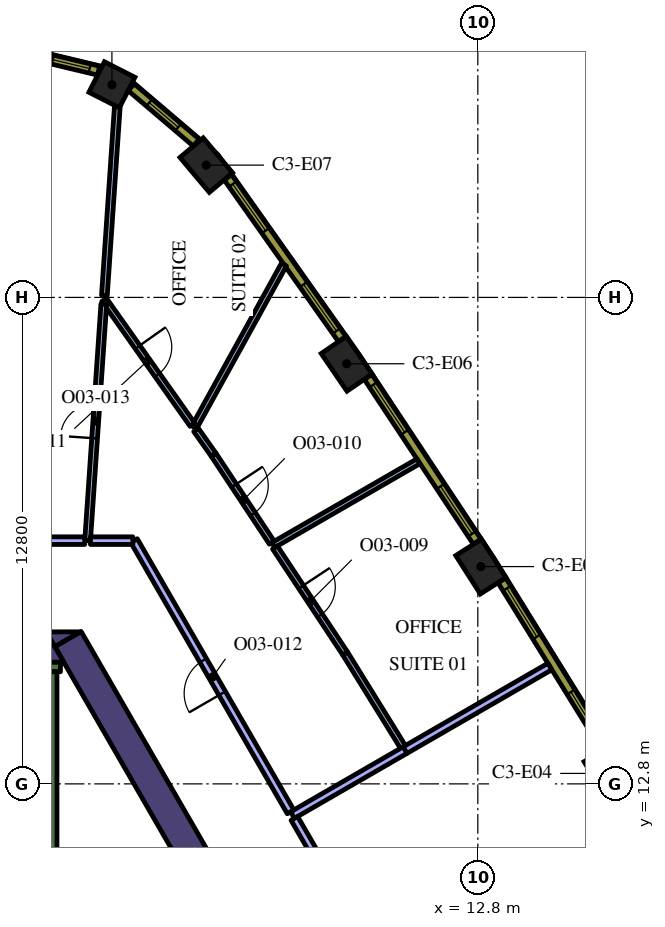
"""IFC4 building model, lengths in metres.
Left out: names, types, materials, properties, quantities, classifications, styles, units other than length and angle.
Written with IfcOpenShell. Run it as: python <this file> out.ifc"""

import sys

from ifc_helpers import new_model, si_unit, direction, frame, frame_2d, origin, origin_2d, place, context, subcontext, project, spatial, polyline, rectangle, outline, extrude, element, fill, save


model = new_model("IFC4")
c1 = context("Model", 3, precision=1e-05, world=origin(), true_north=direction((0.0, 1.0)))
c2 = subcontext(c1, "Body", "Model", "MODEL_VIEW")
j1 = project(units=[si_unit("LENGTHUNIT", "METRE"), si_unit("PLANEANGLEUNIT", "RADIAN")], contexts=[c1])
p1 = place(None, origin())
s1 = spatial("IfcSite", under=j1, at=p1, CompositionType="ELEMENT")
p2 = place(p1, origin())
s2 = spatial("IfcBuilding", under=s1, at=p2, CompositionType="ELEMENT")
p3 = place(p2, frame((0.0, 0.0, 166.8)))
s3 = spatial("IfcBuildingStorey", under=s2, at=p3, CompositionType="ELEMENT", Elevation=166.8)
for number, where, z_axis, x_axis in (
    (1, (16.247, 13.075, 0.0), (0.0, 0.0, 1.0), (-0.513, 0.858, 0.0)),
    (2, (12.88, 18.517, 0.0), (0.0, 0.0, 1.0), (-0.539, 0.842, 0.0)),
    (3, (9.348, 23.854, 0.0), (0.0, 0.0, 1.0), (-0.565, 0.825, 0.0)),
    (4, (5.654, 29.081, 0.0), (0.0, 0.0, 1.0), (-0.644, 0.765, 0.0)),
):
    element("IfcColumn", number, at=place(p3, frame(where, z_axis=z_axis, x_axis=x_axis)), inside=s3, PredefinedType="COLUMN", context=c2, shape_type="SweptSolid", body=[
        extrude(rectangle(XDim=1.2, YDim=0.8, at=origin_2d()), origin(), (0.0, 0.0, 1.0), 4.2),
    ])
p4 = place(p3, frame((3.171, 31.195, 0.0), z_axis=(0.0, 0.0, 1.0), x_axis=(-0.891486197647, 0.453047855535, 0.0)))
e5 = element("IfcColumn", 5, at=p4, inside=s3, PredefinedType="COLUMN", context=c2, shape_type="SweptSolid", body=[
    extrude(rectangle(XDim=0.9, YDim=0.9, at=origin_2d()), origin(), (0.0, 0.0, 1.0), 4.2),
])
p5 = place(p3, frame((8.279, 5.761, 0.0), z_axis=(0.0, 0.0, 1.0), x_axis=(-0.500010359015, 0.866019422922, 0.0)))
e6 = element("IfcWall", 6, at=p5, inside=s3, PredefinedType="SOLIDWALL", context=c2, shape_type="SweptSolid", body=[
    extrude(rectangle(XDim=12.528, YDim=0.8, at=frame_2d((6.264, 0.0))), origin(), (0.0, 0.0, 1.0), 4.2),
])
p6 = place(p3, origin())
e7 = element("IfcWall", 7, at=p6, inside=s3, PredefinedType="SOLIDWALL", context=c2, shape_type="SweptSolid", body=[
    extrude(outline(polyline([(1.443, 16.8), (2.339, 16.8), (1.667, 16.412), (1.443, 16.8)])), origin(), (0.0, 0.0, 1.0), 4.2),
])
e8 = element("IfcWall", 8, at=p6, inside=s3, PredefinedType="SOLIDWALL", context=c2, shape_type="SweptSolid", body=[
    extrude(outline(polyline([(1.905, 16.0), (1.447, 16.0), (1.447, 16.793), (1.905, 16.0)])), origin(), (0.0, 0.0, 1.0), 4.2),
])
p7 = place(p3, frame((-1.817, 15.875, 0.0), z_axis=(0.0, 0.0, 1.0), x_axis=(1.0, 0.0, 0.0)))
e9 = element("IfcWall", 9, at=p7, inside=s3, PredefinedType="SOLIDWALL", context=c2, shape_type="SweptSolid", body=[
    extrude(rectangle(XDim=3.634, YDim=0.25, at=frame_2d((1.817, 0.0))), origin(), (0.0, 0.0, 1.0), 4.2),
])
p8 = place(p3, frame((1.6, 8.95, 0.0), z_axis=(0.0, 0.0, 1.0), x_axis=(0.0, 1.0, 0.0)))
e10 = element("IfcWall", 10, at=p8, inside=s3, PredefinedType="SOLIDWALL", context=c2, shape_type="SweptSolid", body=[
    extrude(rectangle(XDim=6.8, YDim=0.25, at=frame_2d((3.4, 0.0))), origin(), (0.0, 0.0, 1.0), 4.2),
])
p9 = place(p3, frame((10.879, 13.685, 0.0), z_axis=(0.0, 0.0, 1.0), x_axis=(0.866035177799, 0.499983070528, 0.0)))
e11 = element("IfcWall", 11, at=p9, inside=s3, PredefinedType="PARTITIONING", context=c2, shape_type="SweptSolid", body=[
    extrude(rectangle(XDim=4.406, YDim=0.2, at=frame_2d((2.203, 0.0))), origin(), (0.0, 0.0, 1.0), 3.15),
])
p10 = place(p3, frame((7.922, 11.978, 0.0), z_axis=(0.0, 0.0, 1.0), x_axis=(0.866008564848, 0.50002916476, 0.0)))
e12 = element("IfcWall", 12, at=p10, inside=s3, PredefinedType="PARTITIONING", context=c2, shape_type="SweptSolid", body=[
    extrude(rectangle(XDim=3.422, YDim=0.2, at=frame_2d((1.711, 0.0))), origin(), (0.0, 0.0, 1.0), 3.15),
])
p11 = place(p3, frame((9.111, 9.918, 0.0), z_axis=(0.0, 0.0, 1.0), x_axis=(-0.499954382462, 0.86605173948, 0.0)))
e13 = element("IfcWall", 13, at=p11, inside=s3, PredefinedType="PARTITIONING", context=c2, shape_type="SweptSolid", body=[
    extrude(rectangle(XDim=2.278, YDim=0.2, at=frame_2d((1.139, 0.0))), origin(), (0.0, 0.0, 1.0), 3.15),
])
p12 = place(p3, frame((7.42, 19.085, 0.0), z_axis=(0.0, 0.0, 1.0), x_axis=(0.866012184407, 0.500022895934, 0.0)))
e14 = element("IfcWall", 14, at=p12, inside=s3, PredefinedType="PARTITIONING", context=c2, shape_type="SweptSolid", body=[
    extrude(rectangle(XDim=4.408, YDim=0.15, at=frame_2d((2.204, 0.0))), origin(), (0.0, 0.0, 1.0), 3.15),
])
p13 = place(p3, frame((10.83, 13.772, 0.0), z_axis=(0.0, 0.0, 1.0), x_axis=(-0.526229630206, 0.850342505284, 0.0)))
e15 = element("IfcWall", 15, at=p13, inside=s3, PredefinedType="PARTITIONING", context=c2, shape_type="SweptSolid", body=[
    extrude(rectangle(XDim=2.892, YDim=0.15, at=frame_2d((1.446, 0.0))), origin(), (0.0, 0.0, 1.0), 3.15),
])
p14 = place(p3, frame((7.461, 19.022, 0.0), z_axis=(0.0, 0.0, 1.0), x_axis=(0.551902709159, -0.833908507945, 0.0)))
e16 = element("IfcWall", 16, at=p14, inside=s3, PredefinedType="PARTITIONING", context=c2, shape_type="SweptSolid", body=[
    extrude(rectangle(XDim=3.347, YDim=0.15, at=frame_2d((1.673, 0.0))), origin(), (0.0, 0.0, 1.0), 3.15),
])
p15 = place(p14, frame((1.247, 0.0, 0.0)))
e17 = element("IfcOpeningElement", 17, at=p15, cuts=e16, PredefinedType="OPENING", context=c2, shape_type="SweptSolid", body=[
    extrude(rectangle(XDim=0.9, YDim=2.1, at=frame_2d((0.45, 1.05))), frame((0.0, 0.085, 0.0), z_axis=(0.0, -1.0, 0.0), x_axis=(1.0, 0.0, 0.0)), (0.0, 0.0, 1.0), 0.17),
])
p16 = place(p3, frame((5.337, 22.183, 0.0), z_axis=(0.0, 0.0, 1.0), x_axis=(0.482995509385, 0.875622828571, 0.0)))
e18 = element("IfcWall", 18, at=p16, inside=s3, PredefinedType="PARTITIONING", context=c2, shape_type="SweptSolid", body=[
    extrude(rectangle(XDim=4.89, YDim=0.15, at=frame_2d((2.445, 0.0))), origin(), (0.0, 0.0, 1.0), 3.15),
])
p17 = place(p3, frame((5.848, 21.46, 0.0), z_axis=(0.0, 0.0, 1.0), x_axis=(0.551934419249, -0.833887520502, 0.0)))
e19 = element("IfcWall", 19, at=p17, inside=s3, PredefinedType="PARTITIONING", context=c2, shape_type="SweptSolid", body=[
    extrude(rectangle(XDim=2.773, YDim=0.15, at=frame_2d((1.387, 0.0))), origin(), (0.0, 0.0, 1.0), 3.15),
])
p18 = place(p17, frame((0.973, 0.0, 0.0)))
e20 = element("IfcOpeningElement", 20, at=p18, cuts=e19, PredefinedType="OPENING", context=c2, shape_type="SweptSolid", body=[
    extrude(rectangle(XDim=0.9, YDim=2.1, at=frame_2d((0.45, 1.05))), frame((0.0, 0.085, 0.0), z_axis=(0.0, -1.0, 0.0), x_axis=(1.0, 0.0, 0.0)), (0.0, 0.0, 1.0), 0.17),
])
p19 = place(p3, frame((5.848, 21.46, 0.0), z_axis=(0.0, 0.0, 1.0), x_axis=(-0.577113333385, 0.816664068286, 0.0)))
e21 = element("IfcWall", 21, at=p19, inside=s3, PredefinedType="PARTITIONING", context=c2, shape_type="SweptSolid", body=[
    extrude(rectangle(XDim=0.802, YDim=0.15, at=frame_2d((0.401, 0.0))), origin(), (0.0, 0.0, 1.0), 3.15),
])
p20 = place(p3, frame((2.966, 25.539, 0.0), z_axis=(0.0, 0.0, 1.0), x_axis=(0.577099839594, -0.816673603798, 0.0)))
e22 = element("IfcWall", 22, at=p20, inside=s3, PredefinedType="PARTITIONING", context=c2, shape_type="SweptSolid", body=[
    extrude(rectangle(XDim=4.025, YDim=0.15, at=frame_2d((2.013, 0.0))), origin(), (0.0, 0.0, 1.0), 3.15),
])
p21 = place(p20, frame((1.525, 0.0, 0.0)))
e23 = element("IfcOpeningElement", 23, at=p21, cuts=e22, PredefinedType="OPENING", context=c2, shape_type="SweptSolid", body=[
    extrude(rectangle(XDim=0.9, YDim=2.1, at=frame_2d((0.45, 1.05))), frame((0.0, 0.085, 0.0), z_axis=(0.0, -1.0, 0.0), x_axis=(1.0, 0.0, 0.0)), (0.0, 0.0, 1.0), 0.17),
])
p22 = place(p3, frame((2.974, 25.657, 0.0), z_axis=(0.0, 0.0, 1.0), x_axis=(0.068301586051, 0.997664719905, 0.0)))
e24 = element("IfcWall", 24, at=p22, inside=s3, PredefinedType="PARTITIONING", context=c2, shape_type="SweptSolid", body=[
    extrude(rectangle(XDim=4.972, YDim=0.15, at=frame_2d((2.486, 0.0))), origin(), (0.0, 0.0, 1.0), 3.15),
])
p23 = place(p3, frame((2.531, 19.2, 0.0), z_axis=(0.0, 0.0, 1.0), x_axis=(0.06832771358, 0.997662930832, 0.0)))
e25 = element("IfcWall", 25, at=p23, inside=s3, PredefinedType="PARTITIONING", context=c2, shape_type="SweptSolid", body=[
    extrude(rectangle(XDim=6.235, YDim=0.15, at=frame_2d((3.118, 0.0))), origin(), (0.0, 0.0, 1.0), 3.15),
])
p24 = place(p23, frame((2.7, 0.0, 0.0)))
e26 = element("IfcOpeningElement", 26, at=p24, cuts=e25, PredefinedType="OPENING", context=c2, shape_type="SweptSolid", body=[
    extrude(rectangle(XDim=0.9, YDim=2.1, at=frame_2d((0.45, 1.05))), frame((0.0, 0.085, 0.0), z_axis=(0.0, -1.0, 0.0), x_axis=(1.0, 0.0, 0.0)), (0.0, 0.0, 1.0), 0.17),
])
p25 = place(p3, frame((7.872, 12.064, 0.0), z_axis=(0.0, 0.0, 1.0), x_axis=(-0.499995192696, 0.866028179265, 0.0)))
e27 = element("IfcWall", 27, at=p25, inside=s3, PredefinedType="PARTITIONING", context=c2, shape_type="SweptSolid", body=[
    extrude(rectangle(XDim=8.239, YDim=0.2, at=frame_2d((4.12, 0.0))), origin(), (0.0, 0.0, 1.0), 3.15),
])
p26 = place(p25, frame((3.6, 0.0, 0.0)))
e28 = element("IfcOpeningElement", 28, at=p26, cuts=e27, PredefinedType="OPENING", context=c2, shape_type="SweptSolid", body=[
    extrude(rectangle(XDim=1.0, YDim=2.1, at=frame_2d((0.5, 1.05))), frame((0.0, 0.11, 0.0), z_axis=(0.0, -1.0, 0.0), x_axis=(1.0, 0.0, 0.0)), (0.0, 0.0, 1.0), 0.22),
])
p27 = place(p3, frame((3.723, 19.2, 0.0), z_axis=(0.0, 0.0, 1.0), x_axis=(-1.0, 0.0, 0.0)))
e29 = element("IfcWall", 29, at=p27, inside=s3, PredefinedType="PARTITIONING", context=c2, shape_type="SweptSolid", body=[
    extrude(rectangle(XDim=1.116, YDim=0.2, at=frame_2d((0.558, 0.0))), origin(), (0.0, 0.0, 1.0), 3.15),
])
p28 = place(p3, frame((2.456, 19.2, 0.0), z_axis=(0.0, 0.0, 1.0), x_axis=(-1.0, 0.0, 0.0)))
e30 = element("IfcWall", 30, at=p28, inside=s3, PredefinedType="PARTITIONING", context=c2, shape_type="SweptSolid", body=[
    extrude(rectangle(XDim=5.41, YDim=0.2, at=frame_2d((2.705, 0.0))), origin(), (0.0, 0.0, 1.0), 3.15),
])
p29 = place(p3, frame((16.171, 13.731, 0.0), z_axis=(0.0, 0.0, 1.0), x_axis=(-0.526197926587, 0.850362124072, 0.0)))
e31 = element("IfcWall", 31, at=p29, inside=s3, PredefinedType="SOLIDWALL", context=c2, shape_type="SweptSolid", body=[
    extrude(rectangle(XDim=5.203, YDim=0.24, at=frame_2d((2.602, 0.0))), origin(), (0.0, 0.0, 1.0), 3.95),
])
p30 = place(p29, frame((0.248, 0.0, 0.9)))
e32 = element("IfcOpeningElement", 32, at=p30, cuts=e31, PredefinedType="OPENING", context=c2, shape_type="SweptSolid", body=[
    extrude(rectangle(XDim=1.5, YDim=2.55, at=frame_2d((0.75, 1.275))), frame((0.0, 0.13, 0.0), z_axis=(0.0, -1.0, 0.0), x_axis=(1.0, 0.0, 0.0)), (0.0, 0.0, 1.0), 0.26),
])
p31 = place(p29, frame((3.455, 0.0, 0.9)))
e33 = element("IfcOpeningElement", 33, at=p31, cuts=e31, PredefinedType="OPENING", context=c2, shape_type="SweptSolid", body=[
    extrude(rectangle(XDim=1.5, YDim=2.55, at=frame_2d((0.75, 1.275))), frame((0.0, 0.13, 0.0), z_axis=(0.0, -1.0, 0.0), x_axis=(1.0, 0.0, 0.0)), (0.0, 0.0, 1.0), 0.26),
])
p32 = place(p3, frame((12.783, 19.171, 0.0), z_axis=(0.0, 0.0, 1.0), x_axis=(-0.551892811511, 0.833915058386, 0.0)))
e34 = element("IfcWall", 34, at=p32, inside=s3, PredefinedType="SOLIDWALL", context=c2, shape_type="SweptSolid", body=[
    extrude(rectangle(XDim=5.204, YDim=0.24, at=frame_2d((2.602, 0.0))), origin(), (0.0, 0.0, 1.0), 3.95),
])
p33 = place(p32, frame((0.248, 0.0, 0.9)))
e35 = element("IfcOpeningElement", 35, at=p33, cuts=e34, PredefinedType="OPENING", context=c2, shape_type="SweptSolid", body=[
    extrude(rectangle(XDim=1.5, YDim=2.55, at=frame_2d((0.75, 1.275))), frame((0.0, 0.13, 0.0), z_axis=(0.0, -1.0, 0.0), x_axis=(1.0, 0.0, 0.0)), (0.0, 0.0, 1.0), 0.26),
])
p34 = place(p32, frame((3.455, 0.0, 0.9)))
e36 = element("IfcOpeningElement", 36, at=p34, cuts=e34, PredefinedType="OPENING", context=c2, shape_type="SweptSolid", body=[
    extrude(rectangle(XDim=1.5, YDim=2.55, at=frame_2d((0.75, 1.275))), frame((0.0, 0.13, 0.0), z_axis=(0.0, -1.0, 0.0), x_axis=(1.0, 0.0, 0.0)), (0.0, 0.0, 1.0), 0.26),
])
p35 = place(p3, frame((9.231, 24.504, 0.0), z_axis=(0.0, 0.0, 1.0), x_axis=(-0.577115207679, 0.816662743772, 0.0)))
e37 = element("IfcWall", 37, at=p35, inside=s3, PredefinedType="SOLIDWALL", context=c2, shape_type="SweptSolid", body=[
    extrude(rectangle(XDim=5.213, YDim=0.24, at=frame_2d((2.606, 0.0))), origin(), (0.0, 0.0, 1.0), 3.95),
])
p36 = place(p35, frame((0.261, 0.0, 0.9)))
e38 = element("IfcOpeningElement", 38, at=p36, cuts=e37, PredefinedType="OPENING", context=c2, shape_type="SweptSolid", body=[
    extrude(rectangle(XDim=1.5, YDim=2.55, at=frame_2d((0.75, 1.275))), frame((0.0, 0.13, 0.0), z_axis=(0.0, -1.0, 0.0), x_axis=(1.0, 0.0, 0.0)), (0.0, 0.0, 1.0), 0.26),
])
p37 = place(p35, frame((3.492, 0.0, 0.9)))
e39 = element("IfcOpeningElement", 39, at=p37, cuts=e37, PredefinedType="OPENING", context=c2, shape_type="SweptSolid", body=[
    extrude(rectangle(XDim=1.5, YDim=2.55, at=frame_2d((0.75, 1.275))), frame((0.0, 0.13, 0.0), z_axis=(0.0, -1.0, 0.0), x_axis=(1.0, 0.0, 0.0)), (0.0, 0.0, 1.0), 0.26),
])
p38 = place(p3, frame((5.392, 29.672, 0.0), z_axis=(0.0, 0.0, 1.0), x_axis=(-0.761419744247, 0.648259186645, 0.0)))
e40 = element("IfcWall", 40, at=p38, inside=s3, PredefinedType="SOLIDWALL", context=c2, shape_type="SweptSolid", body=[
    extrude(rectangle(XDim=2.25, YDim=0.24, at=frame_2d((1.125, 0.0))), origin(), (0.0, 0.0, 1.0), 3.95),
])
p39 = place(p38, frame((0.625, 0.0, 0.9)))
e41 = element("IfcOpeningElement", 41, at=p39, cuts=e40, PredefinedType="OPENING", context=c2, shape_type="SweptSolid", body=[
    extrude(rectangle(XDim=1.0, YDim=2.55, at=frame_2d((0.5, 1.275))), frame((0.0, 0.13, 0.0), z_axis=(0.0, -1.0, 0.0), x_axis=(1.0, 0.0, 0.0)), (0.0, 0.0, 1.0), 0.26),
])
p40 = place(p3, frame((2.821, 31.566, 0.0), z_axis=(0.0, 0.0, 1.0), x_axis=(-0.972479955788, 0.232986556673, 0.0)))
e42 = element("IfcWall", 42, at=p40, inside=s3, PredefinedType="SOLIDWALL", context=c2, shape_type="SweptSolid", body=[
    extrude(rectangle(XDim=1.482, YDim=0.24, at=frame_2d((0.741, 0.0))), origin(), (0.0, 0.0, 1.0), 3.95),
])
p41 = place(p40, frame((0.241, 0.0, 0.9)))
e43 = element("IfcOpeningElement", 43, at=p41, cuts=e42, PredefinedType="OPENING", context=c2, shape_type="SweptSolid", body=[
    extrude(rectangle(XDim=1.0, YDim=2.55, at=frame_2d((0.5, 1.275))), frame((0.0, 0.13, 0.0), z_axis=(0.0, -1.0, 0.0), x_axis=(1.0, 0.0, 0.0)), (0.0, 0.0, 1.0), 0.26),
])
p42 = place(p15, origin())
e44 = element("IfcDoor", 44, at=p42, inside=s3, OperationType="SINGLE_SWING_RIGHT", PredefinedType="DOOR", context=c2, shape_type="SweptSolid", body=[
    extrude(rectangle(XDim=0.9, YDim=2.1, at=frame_2d((0.45, 1.05))), frame((0.0, 0.025, 0.0), z_axis=(0.0, -1.0, 0.0), x_axis=(1.0, 0.0, 0.0)), (0.0, 0.0, 1.0), 0.05),
])
fill(e17, e44)
p43 = place(p18, origin())
e45 = element("IfcDoor", 45, at=p43, inside=s3, OperationType="SINGLE_SWING_RIGHT", PredefinedType="DOOR", context=c2, shape_type="SweptSolid", body=[
    extrude(rectangle(XDim=0.9, YDim=2.1, at=frame_2d((0.45, 1.05))), frame((0.0, 0.025, 0.0), z_axis=(0.0, -1.0, 0.0), x_axis=(1.0, 0.0, 0.0)), (0.0, 0.0, 1.0), 0.05),
])
fill(e20, e45)
p44 = place(p21, origin())
e46 = element("IfcDoor", 46, at=p44, inside=s3, OperationType="SINGLE_SWING_LEFT", PredefinedType="DOOR", context=c2, shape_type="SweptSolid", body=[
    extrude(rectangle(XDim=0.9, YDim=2.1, at=frame_2d((0.45, 1.05))), frame((0.0, 0.025, 0.0), z_axis=(0.0, -1.0, 0.0), x_axis=(1.0, 0.0, 0.0)), (0.0, 0.0, 1.0), 0.05),
])
fill(e23, e46)
p45 = place(p26, origin())
e47 = element("IfcDoor", 47, at=p45, inside=s3, OperationType="SINGLE_SWING_LEFT", PredefinedType="DOOR", context=c2, shape_type="SweptSolid", body=[
    extrude(rectangle(XDim=1.0, YDim=2.1, at=frame_2d((0.5, 1.05))), frame((0.0, 0.025, 0.0), z_axis=(0.0, -1.0, 0.0), x_axis=(1.0, 0.0, 0.0)), (0.0, 0.0, 1.0), 0.05),
])
fill(e28, e47)
p46 = place(p24, origin())
e48 = element("IfcDoor", 48, at=p46, inside=s3, OperationType="SINGLE_SWING_RIGHT", PredefinedType="DOOR", context=c2, shape_type="SweptSolid", body=[
    extrude(rectangle(XDim=0.9, YDim=2.1, at=frame_2d((0.45, 1.05))), frame((0.0, 0.025, 0.0), z_axis=(0.0, -1.0, 0.0), x_axis=(1.0, 0.0, 0.0)), (0.0, 0.0, 1.0), 0.05),
])
fill(e26, e48)
p47 = place(p30, origin())
e49 = element("IfcWindow", 49, at=p47, inside=s3, PartitioningType="SINGLE_PANEL", PredefinedType="WINDOW", context=c2, shape_type="SweptSolid", body=[
    extrude(rectangle(XDim=1.5, YDim=2.55, at=frame_2d((0.75, 1.275))), frame((0.0, 0.04, 0.0), z_axis=(0.0, -1.0, 0.0), x_axis=(1.0, 0.0, 0.0)), (0.0, 0.0, 1.0), 0.06),
])
fill(e32, e49)
p48 = place(p31, origin())
e50 = element("IfcWindow", 50, at=p48, inside=s3, PartitioningType="SINGLE_PANEL", PredefinedType="WINDOW", context=c2, shape_type="SweptSolid", body=[
    extrude(rectangle(XDim=1.5, YDim=2.55, at=frame_2d((0.75, 1.275))), frame((0.0, 0.04, 0.0), z_axis=(0.0, -1.0, 0.0), x_axis=(1.0, 0.0, 0.0)), (0.0, 0.0, 1.0), 0.06),
])
fill(e33, e50)
p49 = place(p33, origin())
e51 = element("IfcWindow", 51, at=p49, inside=s3, PartitioningType="SINGLE_PANEL", PredefinedType="WINDOW", context=c2, shape_type="SweptSolid", body=[
    extrude(rectangle(XDim=1.5, YDim=2.55, at=frame_2d((0.75, 1.275))), frame((0.0, 0.04, 0.0), z_axis=(0.0, -1.0, 0.0), x_axis=(1.0, 0.0, 0.0)), (0.0, 0.0, 1.0), 0.06),
])
fill(e35, e51)
p50 = place(p34, origin())
e52 = element("IfcWindow", 52, at=p50, inside=s3, PartitioningType="SINGLE_PANEL", PredefinedType="WINDOW", context=c2, shape_type="SweptSolid", body=[
    extrude(rectangle(XDim=1.5, YDim=2.55, at=frame_2d((0.75, 1.275))), frame((0.0, 0.04, 0.0), z_axis=(0.0, -1.0, 0.0), x_axis=(1.0, 0.0, 0.0)), (0.0, 0.0, 1.0), 0.06),
])
fill(e36, e52)
p51 = place(p36, origin())
e53 = element("IfcWindow", 53, at=p51, inside=s3, PartitioningType="SINGLE_PANEL", PredefinedType="WINDOW", context=c2, shape_type="SweptSolid", body=[
    extrude(rectangle(XDim=1.5, YDim=2.55, at=frame_2d((0.75, 1.275))), frame((0.0, 0.04, 0.0), z_axis=(0.0, -1.0, 0.0), x_axis=(1.0, 0.0, 0.0)), (0.0, 0.0, 1.0), 0.06),
])
fill(e38, e53)
p52 = place(p37, origin())
e54 = element("IfcWindow", 54, at=p52, inside=s3, PartitioningType="SINGLE_PANEL", PredefinedType="WINDOW", context=c2, shape_type="SweptSolid", body=[
    extrude(rectangle(XDim=1.5, YDim=2.55, at=frame_2d((0.75, 1.275))), frame((0.0, 0.04, 0.0), z_axis=(0.0, -1.0, 0.0), x_axis=(1.0, 0.0, 0.0)), (0.0, 0.0, 1.0), 0.06),
])
fill(e39, e54)
p53 = place(p39, origin())
e55 = element("IfcWindow", 55, at=p53, inside=s3, PartitioningType="SINGLE_PANEL", PredefinedType="WINDOW", context=c2, shape_type="SweptSolid", body=[
    extrude(rectangle(XDim=1.0, YDim=2.55, at=frame_2d((0.5, 1.275))), frame((0.0, 0.04, 0.0), z_axis=(0.0, -1.0, 0.0), x_axis=(1.0, 0.0, 0.0)), (0.0, 0.0, 1.0), 0.06),
])
fill(e41, e55)
p54 = place(p41, origin())
e56 = element("IfcWindow", 56, at=p54, inside=s3, PartitioningType="SINGLE_PANEL", PredefinedType="WINDOW", context=c2, shape_type="SweptSolid", body=[
    extrude(rectangle(XDim=1.0, YDim=2.55, at=frame_2d((0.5, 1.275))), frame((0.0, 0.04, 0.0), z_axis=(0.0, -1.0, 0.0), x_axis=(1.0, 0.0, 0.0)), (0.0, 0.0, 1.0), 0.06),
])
fill(e43, e56)
save(model, sys.argv[1])
